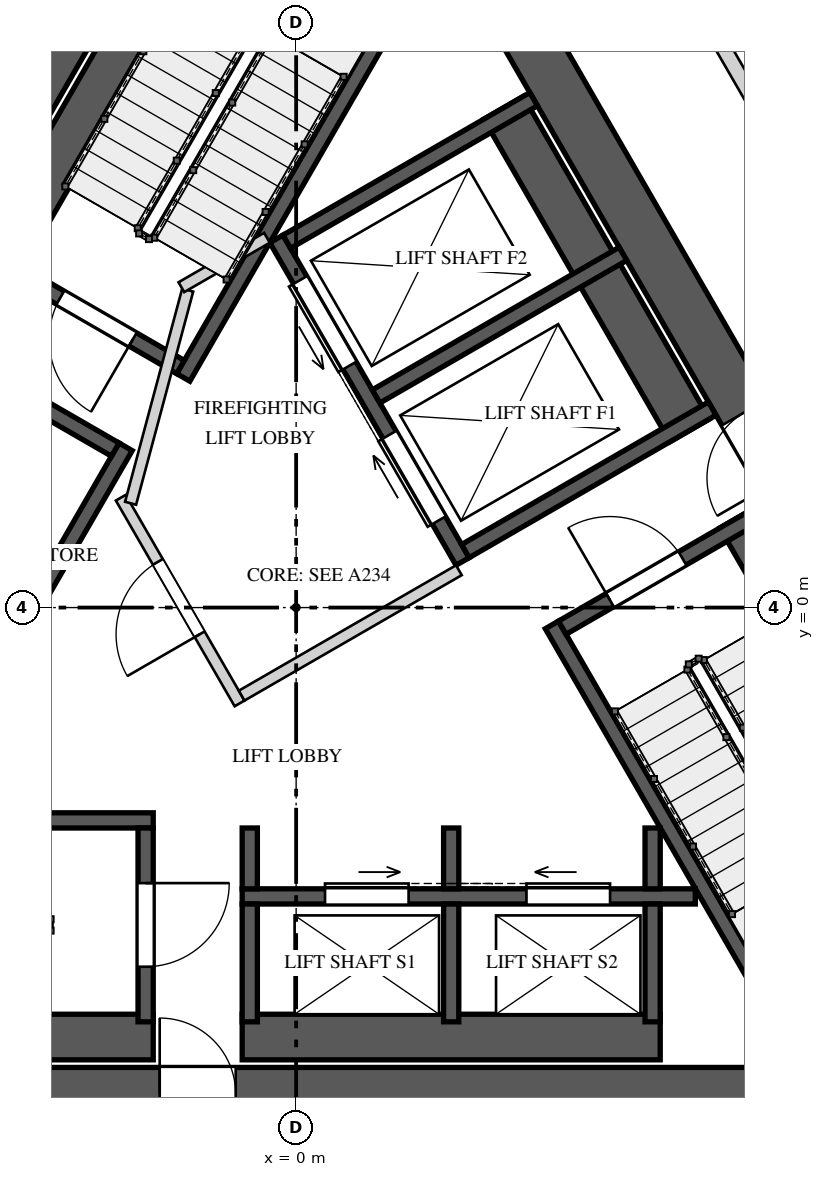
"""IFC4 building model, lengths in metres.
Left out: names, types, materials, properties, quantities, classifications, styles, units other than length and angle.
Written with IfcOpenShell. Run it as: python <this file> out.ifc"""

import sys

from ifc_helpers import new_model, si_unit, direction, frame, frame_2d, origin, place, context, subcontext, project, spatial, rectangle, extrude, element, fill, save


model = new_model("IFC4")
c1 = context("Model", 3, precision=1e-05, world=origin(), true_north=direction((0.0, 1.0)))
c2 = subcontext(c1, "Body", "Model", "MODEL_VIEW")
j1 = project(units=[si_unit("LENGTHUNIT", "METRE"), si_unit("PLANEANGLEUNIT", "RADIAN")], contexts=[c1])
p1 = place(None, origin())
s1 = spatial("IfcSite", under=j1, at=p1, CompositionType="ELEMENT")
p2 = place(p1, origin())
s2 = spatial("IfcBuilding", under=s1, at=p2, CompositionType="ELEMENT")
p3 = place(p2, frame((0.0, 0.0, 245.2)))
s3 = spatial("IfcBuildingStorey", under=s2, at=p3, CompositionType="ELEMENT", Elevation=245.2)
p4 = place(p3, frame((-1.241, 10.65, 0.0), z_axis=(0.0, 0.0, 1.0), x_axis=(-0.500003331888, -0.866023480109, 0.0)))
e1 = element("IfcWall", 1, at=p4, inside=s3, PredefinedType="SHEAR", context=c2, shape_type="SweptSolid", body=[
    extrude(rectangle(XDim=17.205, YDim=0.7, at=frame_2d((8.603, 0.0))), origin(), (0.0, 0.0, 1.0), 4.0),
])
p5 = place(p4, frame((6.808, 0.0, 0.0)))
e2 = element("IfcOpeningElement", 2, at=p5, cuts=e1, PredefinedType="OPENING", context=c2, shape_type="SweptSolid", body=[
    extrude(rectangle(XDim=1.0, YDim=2.4, at=frame_2d((0.5, 1.2))), frame((0.0, 0.36, 0.0), z_axis=(0.0, -1.0, 0.0), x_axis=(1.0, 0.0, 0.0)), (0.0, 0.0, 1.0), 0.72),
])
p6 = place(p4, frame((14.922, 0.0, 0.0)))
e3 = element("IfcOpeningElement", 3, at=p6, cuts=e1, PredefinedType="OPENING", context=c2, shape_type="SweptSolid", body=[
    extrude(rectangle(XDim=0.8, YDim=2.1, at=frame_2d((0.4, 1.05))), frame((0.0, 0.36, 0.0), z_axis=(0.0, -1.0, 0.0), x_axis=(1.0, 0.0, 0.0)), (0.0, 0.0, 1.0), 0.72),
])
p7 = place(p3, frame((-8.603, -6.4, 0.0), z_axis=(0.0, 0.0, 1.0), x_axis=(1.0, 0.0, 0.0)))
e4 = element("IfcWall", 4, at=p7, inside=s3, PredefinedType="SHEAR", context=c2, shape_type="SweptSolid", body=[
    extrude(rectangle(XDim=17.205, YDim=0.7, at=frame_2d((8.603, 0.0))), origin(), (0.0, 0.0, 1.0), 4.0),
])
p8 = place(p7, frame((6.808, 0.0, 0.0)))
e5 = element("IfcOpeningElement", 5, at=p8, cuts=e4, PredefinedType="OPENING", context=c2, shape_type="SweptSolid", body=[
    extrude(rectangle(XDim=1.0, YDim=2.4, at=frame_2d((0.5, 1.2))), frame((0.0, 0.36, 0.0), z_axis=(0.0, -1.0, 0.0), x_axis=(1.0, 0.0, 0.0)), (0.0, 0.0, 1.0), 0.72),
])
p9 = place(p3, frame((9.844, -4.25, 0.0), z_axis=(0.0, 0.0, 1.0), x_axis=(-0.500003331888, 0.866023480109, 0.0)))
e6 = element("IfcWall", 6, at=p9, inside=s3, PredefinedType="SHEAR", context=c2, shape_type="SweptSolid", body=[
    extrude(rectangle(XDim=17.205, YDim=0.7, at=frame_2d((8.603, 0.0))), origin(), (0.0, 0.0, 1.0), 4.0),
])
p10 = place(p9, frame((6.877, 0.0, 0.0)))
e7 = element("IfcOpeningElement", 7, at=p10, cuts=e6, PredefinedType="OPENING", context=c2, shape_type="SweptSolid", body=[
    extrude(rectangle(XDim=1.0, YDim=2.4, at=frame_2d((0.5, 1.2))), frame((0.0, 0.36, 0.0), z_axis=(0.0, -1.0, 0.0), x_axis=(1.0, 0.0, 0.0)), (0.0, 0.0, 1.0), 0.72),
])
p11 = place(p3, frame((-0.853, 9.823, 0.0), z_axis=(0.0, 0.0, 1.0), x_axis=(-0.500009909098, -0.866019682689, 0.0)))
e8 = element("IfcWall", 8, at=p11, inside=s3, PredefinedType="SOLIDWALL", context=c2, shape_type="SweptSolid", body=[
    extrude(rectangle(XDim=6.2, YDim=0.6, at=frame_2d((3.1, 0.0))), origin(), (0.0, 0.0, 1.0), 3.65),
])
p12 = place(p3, frame((1.876, 8.85, 0.0), z_axis=(0.0, 0.0, 1.0), x_axis=(-0.499998042495, -0.866026533947, 0.0)))
e9 = element("IfcWall", 9, at=p12, inside=s3, PredefinedType="SOLIDWALL", context=c2, shape_type="SweptSolid", body=[
    extrude(rectangle(XDim=6.723, YDim=0.2, at=frame_2d((3.361, 0.0))), origin(), (0.0, 0.0, 1.0), 3.65),
])
p13 = place(p3, frame((-1.521, 3.165, 0.0), z_axis=(0.0, 0.0, 1.0), x_axis=(-0.866035871367, 0.499981869177, 0.0)))
e10 = element("IfcWall", 10, at=p13, inside=s3, PredefinedType="SOLIDWALL", context=c2, shape_type="SweptSolid", body=[
    extrude(rectangle(XDim=3.15, YDim=0.2, at=frame_2d((1.575, 0.0))), origin(), (0.0, 0.0, 1.0), 3.65),
])
p14 = place(p13, frame((0.725, 0.0, 0.0)))
e11 = element("IfcOpeningElement", 11, at=p14, cuts=e10, PredefinedType="OPENING", context=c2, shape_type="SweptSolid", body=[
    extrude(rectangle(XDim=1.1, YDim=2.4, at=frame_2d((0.55, 1.2))), frame((0.0, 0.11, 0.0), z_axis=(0.0, -1.0, 0.0), x_axis=(1.0, 0.0, 0.0)), (0.0, 0.0, 1.0), 0.22),
])
p15 = place(p3, frame((-8.08, -5.65, 0.0), z_axis=(0.0, 0.0, 1.0), x_axis=(1.0, 0.0, 0.0)))
e12 = element("IfcWall", 12, at=p15, inside=s3, PredefinedType="SOLIDWALL", context=c2, shape_type="SweptSolid", body=[
    extrude(rectangle(XDim=6.2, YDim=0.6, at=frame_2d((3.1, 0.0))), origin(), (0.0, 0.0, 1.0), 3.65),
])
p16 = place(p3, frame((-8.603, -2.8, 0.0), z_axis=(0.0, 0.0, 1.0), x_axis=(1.0, 0.0, 0.0)))
e13 = element("IfcWall", 13, at=p16, inside=s3, PredefinedType="SOLIDWALL", context=c2, shape_type="SweptSolid", body=[
    extrude(rectangle(XDim=6.723, YDim=0.2, at=frame_2d((3.361, 0.0))), origin(), (0.0, 0.0, 1.0), 3.65),
])
p17 = place(p3, frame((-1.98, -2.9, 0.0), z_axis=(0.0, 0.0, 1.0), x_axis=(0.0, -1.0, 0.0)))
e14 = element("IfcWall", 14, at=p17, inside=s3, PredefinedType="SOLIDWALL", context=c2, shape_type="SweptSolid", body=[
    extrude(rectangle(XDim=2.55, YDim=0.2, at=frame_2d((1.275, 0.0))), origin(), (0.0, 0.0, 1.0), 3.65),
])
p18 = place(p17, frame((0.725, 0.0, 0.0)))
e15 = element("IfcOpeningElement", 15, at=p18, cuts=e14, PredefinedType="OPENING", context=c2, shape_type="SweptSolid", body=[
    extrude(rectangle(XDim=1.1, YDim=2.4, at=frame_2d((0.55, 1.2))), frame((0.0, 0.11, 0.0), z_axis=(0.0, -1.0, 0.0), x_axis=(1.0, 0.0, 0.0)), (0.0, 0.0, 1.0), 0.22),
])
p19 = place(p3, frame((8.933, -4.172, 0.0), z_axis=(0.0, 0.0, 1.0), x_axis=(-0.500026960575, 0.86600983753, 0.0)))
e16 = element("IfcWall", 16, at=p19, inside=s3, PredefinedType="SOLIDWALL", context=c2, shape_type="SweptSolid", body=[
    extrude(rectangle(XDim=6.2, YDim=0.6, at=frame_2d((3.1, 0.0))), origin(), (0.0, 0.0, 1.0), 3.65),
])
p20 = place(p3, frame((6.726, -6.05, 0.0), z_axis=(0.0, 0.0, 1.0), x_axis=(-0.499970804718, 0.866042259032, 0.0)))
e17 = element("IfcWall", 17, at=p20, inside=s3, PredefinedType="SOLIDWALL", context=c2, shape_type="SweptSolid", body=[
    extrude(rectangle(XDim=6.723, YDim=0.2, at=frame_2d((3.361, 0.0))), origin(), (0.0, 0.0, 1.0), 3.65),
])
p21 = place(p3, frame((3.501, -0.265, 0.0), z_axis=(0.0, 0.0, 1.0), x_axis=(0.866035871367, 0.499981869177, 0.0)))
e18 = element("IfcWall", 18, at=p21, inside=s3, PredefinedType="SOLIDWALL", context=c2, shape_type="SweptSolid", body=[
    extrude(rectangle(XDim=3.15, YDim=0.2, at=frame_2d((1.575, 0.0))), origin(), (0.0, 0.0, 1.0), 3.65),
])
p22 = place(p21, frame((0.725, 0.0, 0.0)))
e19 = element("IfcOpeningElement", 19, at=p22, cuts=e18, PredefinedType="OPENING", context=c2, shape_type="SweptSolid", body=[
    extrude(rectangle(XDim=1.1, YDim=2.4, at=frame_2d((0.55, 1.2))), frame((0.0, 0.11, 0.0), z_axis=(0.0, -1.0, 0.0), x_axis=(1.0, 0.0, 0.0)), (0.0, 0.0, 1.0), 0.22),
])
p23 = place(p3, frame((-4.993, -2.648, 0.0), z_axis=(0.0, 0.0, 1.0), x_axis=(0.499996545922, 0.866027397988, 0.0)))
e20 = element("IfcWall", 20, at=p23, inside=s3, PredefinedType="SOLIDWALL", context=c2, shape_type="SweptSolid", body=[
    extrude(rectangle(XDim=5.5, YDim=0.2, at=frame_2d((2.75, 0.0))), origin(), (0.0, 0.0, 1.0), 3.65),
])
p24 = place(p23, frame((2.275, 0.0, 0.0)))
e21 = element("IfcOpeningElement", 21, at=p24, cuts=e20, PredefinedType="OPENING", context=c2, shape_type="SweptSolid", body=[
    extrude(rectangle(XDim=0.95, YDim=2.4, at=frame_2d((0.475, 1.2))), frame((0.0, 0.11, 0.0), z_axis=(0.0, -1.0, 0.0), x_axis=(1.0, 0.0, 0.0)), (0.0, 0.0, 1.0), 0.22),
])
p25 = place(p3, frame((-2.38, 2.078, 0.0), z_axis=(0.0, 0.0, 1.0), x_axis=(-0.866060182126, 0.499939757307, 0.0)))
e22 = element("IfcWall", 22, at=p25, inside=s3, PredefinedType="SOLIDWALL", context=c2, shape_type="SweptSolid", body=[
    extrude(rectangle(XDim=2.95, YDim=0.2, at=frame_2d((1.475, 0.0))), origin(), (0.0, 0.0, 1.0), 3.65),
])
p26 = place(p3, frame((-0.71, -3.8, 0.0), z_axis=(0.0, 0.0, 1.0), x_axis=(1.0, 0.0, 0.0)))
e23 = element("IfcWall", 23, at=p26, inside=s3, PredefinedType="SOLIDWALL", context=c2, shape_type="SweptSolid", body=[
    extrude(rectangle(XDim=5.961, YDim=0.2, at=frame_2d((2.981, 0.0))), origin(), (0.0, 0.0, 1.0), 3.65),
])
p27 = place(p26, frame((1.09, 0.0, 0.0)))
e24 = element("IfcOpeningElement", 24, at=p27, cuts=e23, PredefinedType="OPENING", context=c2, shape_type="SweptSolid", body=[
    extrude(rectangle(XDim=1.1, YDim=2.1, at=frame_2d((0.55, 1.05))), frame((0.0, 0.11, 0.0), z_axis=(0.0, -1.0, 0.0), x_axis=(1.0, 0.0, 0.0)), (0.0, 0.0, 1.0), 0.22),
])
p28 = place(p26, frame((3.74, 0.0, 0.0)))
e25 = element("IfcOpeningElement", 25, at=p28, cuts=e23, PredefinedType="OPENING", context=c2, shape_type="SweptSolid", body=[
    extrude(rectangle(XDim=1.1, YDim=2.1, at=frame_2d((0.55, 1.05))), frame((0.0, 0.11, 0.0), z_axis=(0.0, -1.0, 0.0), x_axis=(1.0, 0.0, 0.0)), (0.0, 0.0, 1.0), 0.22),
])
p29 = place(p3, frame((-0.71, -5.65, 0.0), z_axis=(0.0, 0.0, 1.0), x_axis=(1.0, 0.0, 0.0)))
e26 = element("IfcWall", 26, at=p29, inside=s3, PredefinedType="SOLIDWALL", context=c2, shape_type="SweptSolid", body=[
    extrude(rectangle(XDim=5.5, YDim=0.6, at=frame_2d((2.75, 0.0))), origin(), (0.0, 0.0, 1.0), 3.65),
])
p30 = place(p3, frame((-0.61, -3.9, 0.0), z_axis=(0.0, 0.0, 1.0), x_axis=(0.0, -1.0, 0.0)))
e27 = element("IfcWall", 27, at=p30, inside=s3, PredefinedType="SOLIDWALL", context=c2, shape_type="SweptSolid", body=[
    extrude(rectangle(XDim=1.55, YDim=0.2, at=frame_2d((0.775, 0.0))), origin(), (0.0, 0.0, 1.0), 3.65),
])
p31 = place(p3, frame((-0.61, -2.9, 0.0), z_axis=(0.0, 0.0, 1.0), x_axis=(0.0, -1.0, 0.0)))
e28 = element("IfcWall", 28, at=p31, inside=s3, PredefinedType="SOLIDWALL", context=c2, shape_type="SweptSolid", body=[
    extrude(rectangle(XDim=0.8, YDim=0.2, at=frame_2d((0.4, 0.0))), origin(), (0.0, 0.0, 1.0), 3.65),
])
p32 = place(p3, frame((2.04, -3.9, 0.0), z_axis=(0.0, 0.0, 1.0), x_axis=(0.0, -1.0, 0.0)))
e29 = element("IfcWall", 29, at=p32, inside=s3, PredefinedType="SOLIDWALL", context=c2, shape_type="SweptSolid", body=[
    extrude(rectangle(XDim=1.55, YDim=0.2, at=frame_2d((0.775, 0.0))), origin(), (0.0, 0.0, 1.0), 3.65),
])
p33 = place(p3, frame((2.04, -2.9, 0.0), z_axis=(0.0, 0.0, 1.0), x_axis=(0.0, -1.0, 0.0)))
e30 = element("IfcWall", 30, at=p33, inside=s3, PredefinedType="SOLIDWALL", context=c2, shape_type="SweptSolid", body=[
    extrude(rectangle(XDim=0.8, YDim=0.2, at=frame_2d((0.4, 0.0))), origin(), (0.0, 0.0, 1.0), 3.65),
])
p34 = place(p3, frame((4.69, -3.9, 0.0), z_axis=(0.0, 0.0, 1.0), x_axis=(0.0, -1.0, 0.0)))
e31 = element("IfcWall", 31, at=p34, inside=s3, PredefinedType="SOLIDWALL", context=c2, shape_type="SweptSolid", body=[
    extrude(rectangle(XDim=1.55, YDim=0.2, at=frame_2d((0.775, 0.0))), origin(), (0.0, 0.0, 1.0), 3.65),
])
p35 = place(p3, frame((4.69, -2.9, 0.0), z_axis=(0.0, 0.0, 1.0), x_axis=(0.0, -1.0, 0.0)))
e32 = element("IfcWall", 32, at=p35, inside=s3, PredefinedType="SOLIDWALL", context=c2, shape_type="SweptSolid", body=[
    extrude(rectangle(XDim=0.8, YDim=0.2, at=frame_2d((0.4, 0.0))), origin(), (0.0, 0.0, 1.0), 3.65),
])
p36 = place(p3, frame((2.19, 0.606, 0.0), z_axis=(0.0, 0.0, 1.0), x_axis=(-0.500002801628, 0.866023786258, 0.0)))
e33 = element("IfcWall", 33, at=p36, inside=s3, PredefinedType="SOLIDWALL", context=c2, shape_type="SweptSolid", body=[
    extrude(rectangle(XDim=4.9, YDim=0.2, at=frame_2d((2.45, 0.0))), origin(), (0.0, 0.0, 1.0), 3.65),
])
p37 = place(p36, frame((0.625, 0.0, 0.0)))
e34 = element("IfcOpeningElement", 34, at=p37, cuts=e33, PredefinedType="OPENING", context=c2, shape_type="SweptSolid", body=[
    extrude(rectangle(XDim=1.3, YDim=2.1, at=frame_2d((0.65, 1.05))), frame((0.0, 0.11, 0.0), z_axis=(0.0, -1.0, 0.0), x_axis=(1.0, 0.0, 0.0)), (0.0, 0.0, 1.0), 0.22),
])
p38 = place(p36, frame((2.975, 0.0, 0.0)))
e35 = element("IfcOpeningElement", 35, at=p38, cuts=e33, PredefinedType="OPENING", context=c2, shape_type="SweptSolid", body=[
    extrude(rectangle(XDim=1.3, YDim=2.1, at=frame_2d((0.65, 1.05))), frame((0.0, 0.11, 0.0), z_axis=(0.0, -1.0, 0.0), x_axis=(1.0, 0.0, 0.0)), (0.0, 0.0, 1.0), 0.22),
])
p39 = place(p3, frame((5.178, 2.331, 0.0), z_axis=(0.0, 0.0, 1.0), x_axis=(-0.49998122708, 0.866036242063, 0.0)))
e36 = element("IfcWall", 36, at=p39, inside=s3, PredefinedType="SOLIDWALL", context=c2, shape_type="SweptSolid", body=[
    extrude(rectangle(XDim=4.9, YDim=0.6, at=frame_2d((2.45, 0.0))), origin(), (0.0, 0.0, 1.0), 3.65),
])
p40 = place(p3, frame((2.227, 0.743, 0.0), z_axis=(0.0, 0.0, 1.0), x_axis=(0.866022959057, 0.500004234368, 0.0)))
e37 = element("IfcWall", 37, at=p40, inside=s3, PredefinedType="SOLIDWALL", context=c2, shape_type="SweptSolid", body=[
    extrude(rectangle(XDim=3.75, YDim=0.2, at=frame_2d((1.875, 0.0))), origin(), (0.0, 0.0, 1.0), 3.65),
])
p41 = place(p3, frame((1.052, 2.778, 0.0), z_axis=(0.0, 0.0, 1.0), x_axis=(0.866039234136, 0.499976044363, 0.0)))
e38 = element("IfcWall", 38, at=p41, inside=s3, PredefinedType="SOLIDWALL", context=c2, shape_type="SweptSolid", body=[
    extrude(rectangle(XDim=3.75, YDim=0.2, at=frame_2d((1.875, 0.0))), origin(), (0.0, 0.0, 1.0), 3.65),
])
p42 = place(p3, frame((-0.123, 4.813, 0.0), z_axis=(0.0, 0.0, 1.0), x_axis=(0.866022959057, 0.500004234368, 0.0)))
e39 = element("IfcWall", 39, at=p42, inside=s3, PredefinedType="SOLIDWALL", context=c2, shape_type="SweptSolid", body=[
    extrude(rectangle(XDim=3.75, YDim=0.2, at=frame_2d((1.875, 0.0))), origin(), (0.0, 0.0, 1.0), 3.65),
])
p43 = place(p3, frame((-0.744, -1.261, 0.0), z_axis=(0.0, 0.0, 1.0), x_axis=(-0.500004234368, 0.866022959057, 0.0)))
e40 = element("IfcWall", 40, at=p43, inside=s3, PredefinedType="PARTITIONING", context=c2, shape_type="SweptSolid", body=[
    extrude(rectangle(XDim=3.125, YDim=0.15, at=frame_2d((1.562, 0.0))), origin(), (0.0, 0.0, 1.0), 3.65),
])
p44 = place(p43, frame((1.05, 0.0, 0.0)))
e41 = element("IfcOpeningElement", 41, at=p44, cuts=e40, PredefinedType="OPENING", context=c2, shape_type="SweptSolid", body=[
    extrude(rectangle(XDim=1.1, YDim=2.4, at=frame_2d((0.55, 1.2))), frame((0.0, 0.085, 0.0), z_axis=(0.0, -1.0, 0.0), x_axis=(1.0, 0.0, 0.0)), (0.0, 0.0, 1.0), 0.17),
])
p45 = place(p3, frame((-0.717, -1.159, 0.0), z_axis=(0.0, 0.0, 1.0), x_axis=(0.866008176907, 0.50002983664, 0.0)))
e42 = element("IfcWall", 42, at=p45, inside=s3, PredefinedType="PARTITIONING", context=c2, shape_type="SweptSolid", body=[
    extrude(rectangle(XDim=3.3, YDim=0.15, at=frame_2d((1.65, 0.0))), origin(), (0.0, 0.0, 1.0), 3.65),
])
p46 = place(p3, frame((-2.178, 1.372, 0.0), z_axis=(0.0, 0.0, 1.0), x_axis=(0.258808958833, 0.96592852884, 0.0)))
e43 = element("IfcWall", 43, at=p46, inside=s3, PredefinedType="PARTITIONING", context=c2, shape_type="SweptSolid", body=[
    extrude(rectangle(XDim=2.903, YDim=0.15, at=frame_2d((1.451, 0.0))), origin(), (0.0, 0.0, 1.0), 3.65),
])
p47 = place(p3, frame((-1.51, 4.215, 0.0), z_axis=(0.0, 0.0, 1.0), x_axis=(0.866085525409, 0.49989585183, 0.0)))
e44 = element("IfcWall", 44, at=p47, inside=s3, PredefinedType="PARTITIONING", context=c2, shape_type="SweptSolid", body=[
    extrude(rectangle(XDim=1.3, YDim=0.15, at=frame_2d((0.65, 0.0))), origin(), (0.0, 0.0, 1.0), 3.65),
])
p48 = place(p3, frame((4.934, 11.253, 0.0), z_axis=(0.0, 0.0, 1.0), x_axis=(0.500001111708, -0.866024761939, 0.0)))
e45 = element("IfcWall", 45, at=p48, inside=s3, PredefinedType="PARTITIONING", context=c2, shape_type="SweptSolid", body=[
    extrude(rectangle(XDim=4.576, YDim=0.15, at=frame_2d((2.288, 0.0))), origin(), (0.0, 0.0, 1.0), 3.65),
])
p49 = place(p48, frame((0.445, 0.0, 0.0)))
e46 = element("IfcOpeningElement", 46, at=p49, cuts=e45, PredefinedType="OPENING", context=c2, shape_type="SweptSolid", body=[
    extrude(rectangle(XDim=0.95, YDim=2.4, at=frame_2d((0.475, 1.2))), frame((0.0, 0.085, 0.0), z_axis=(0.0, -1.0, 0.0), x_axis=(1.0, 0.0, 0.0)), (0.0, 0.0, 1.0), 0.17),
])
p50 = place(p3, frame((4.299, 9.655, 0.0), z_axis=(0.0, 0.0, 1.0), x_axis=(0.499997905474, -0.866026613056, 0.0)))
e47 = element("IfcWall", 47, at=p50, inside=s3, PredefinedType="SOLIDWALL", context=c2, shape_type="SweptSolid", body=[
    extrude(rectangle(XDim=3.811, YDim=0.2, at=frame_2d((1.905, 0.0))), origin(), (0.0, 0.0, 1.0), 3.65),
])
p51 = place(p14, origin())
e48 = element("IfcDoor", 48, at=p51, inside=s3, OperationType="SINGLE_SWING_RIGHT", PredefinedType="DOOR", context=c2, shape_type="SweptSolid", body=[
    extrude(rectangle(XDim=1.1, YDim=2.4, at=frame_2d((0.55, 1.2))), frame((0.0, 0.025, 0.0), z_axis=(0.0, -1.0, 0.0), x_axis=(1.0, 0.0, 0.0)), (0.0, 0.0, 1.0), 0.05),
])
fill(e11, e48)
p52 = place(p18, origin())
e49 = element("IfcDoor", 49, at=p52, inside=s3, OperationType="SINGLE_SWING_LEFT", PredefinedType="DOOR", context=c2, shape_type="SweptSolid", body=[
    extrude(rectangle(XDim=1.1, YDim=2.4, at=frame_2d((0.55, 1.2))), frame((0.0, 0.025, 0.0), z_axis=(0.0, -1.0, 0.0), x_axis=(1.0, 0.0, 0.0)), (0.0, 0.0, 1.0), 0.05),
])
fill(e15, e49)
p53 = place(p22, origin())
e50 = element("IfcDoor", 50, at=p53, inside=s3, OperationType="SINGLE_SWING_RIGHT", PredefinedType="DOOR", context=c2, shape_type="SweptSolid", body=[
    extrude(rectangle(XDim=1.1, YDim=2.4, at=frame_2d((0.55, 1.2))), frame((0.0, 0.025, 0.0), z_axis=(0.0, -1.0, 0.0), x_axis=(1.0, 0.0, 0.0)), (0.0, 0.0, 1.0), 0.05),
])
fill(e19, e50)
p54 = place(p27, origin())
e51 = element("IfcDoor", 51, at=p54, inside=s3, OperationType="SLIDING_TO_RIGHT", PredefinedType="DOOR", context=c2, shape_type="SweptSolid", body=[
    extrude(rectangle(XDim=1.1, YDim=2.1, at=frame_2d((0.55, 1.05))), frame((0.0, 0.025, 0.0), z_axis=(0.0, -1.0, 0.0), x_axis=(1.0, 0.0, 0.0)), (0.0, 0.0, 1.0), 0.05),
])
fill(e24, e51)
p55 = place(p28, origin())
e52 = element("IfcDoor", 52, at=p55, inside=s3, OperationType="SLIDING_TO_LEFT", PredefinedType="DOOR", context=c2, shape_type="SweptSolid", body=[
    extrude(rectangle(XDim=1.1, YDim=2.1, at=frame_2d((0.55, 1.05))), frame((0.0, 0.025, 0.0), z_axis=(0.0, -1.0, 0.0), x_axis=(1.0, 0.0, 0.0)), (0.0, 0.0, 1.0), 0.05),
])
fill(e25, e52)
p56 = place(p37, origin())
e53 = element("IfcDoor", 53, at=p56, inside=s3, OperationType="SLIDING_TO_RIGHT", PredefinedType="DOOR", context=c2, shape_type="SweptSolid", body=[
    extrude(rectangle(XDim=1.3, YDim=2.1, at=frame_2d((0.65, 1.05))), frame((0.0, 0.025, 0.0), z_axis=(0.0, -1.0, 0.0), x_axis=(1.0, 0.0, 0.0)), (0.0, 0.0, 1.0), 0.05),
])
fill(e34, e53)
p57 = place(p38, origin())
e54 = element("IfcDoor", 54, at=p57, inside=s3, OperationType="SLIDING_TO_LEFT", PredefinedType="DOOR", context=c2, shape_type="SweptSolid", body=[
    extrude(rectangle(XDim=1.3, YDim=2.1, at=frame_2d((0.65, 1.05))), frame((0.0, 0.025, 0.0), z_axis=(0.0, -1.0, 0.0), x_axis=(1.0, 0.0, 0.0)), (0.0, 0.0, 1.0), 0.05),
])
fill(e35, e54)
p58 = place(p44, origin())
e55 = element("IfcDoor", 55, at=p58, inside=s3, OperationType="SINGLE_SWING_RIGHT", PredefinedType="DOOR", context=c2, shape_type="SweptSolid", body=[
    extrude(rectangle(XDim=1.1, YDim=2.4, at=frame_2d((0.55, 1.2))), frame((0.0, 0.025, 0.0), z_axis=(0.0, -1.0, 0.0), x_axis=(1.0, 0.0, 0.0)), (0.0, 0.0, 1.0), 0.05),
])
fill(e41, e55)
p59 = place(p8, origin())
e56 = element("IfcDoor", 56, at=p59, inside=s3, OperationType="SINGLE_SWING_RIGHT", PredefinedType="DOOR", context=c2, shape_type="SweptSolid", body=[
    extrude(rectangle(XDim=1.0, YDim=2.4, at=frame_2d((0.5, 1.2))), frame((0.0, 0.025, 0.0), z_axis=(0.0, -1.0, 0.0), x_axis=(1.0, 0.0, 0.0)), (0.0, 0.0, 1.0), 0.05),
])
fill(e5, e56)
p60 = place(p10, origin())
e57 = element("IfcDoor", 57, at=p60, inside=s3, OperationType="SINGLE_SWING_LEFT", PredefinedType="DOOR", context=c2, shape_type="SweptSolid", body=[
    extrude(rectangle(XDim=1.0, YDim=2.4, at=frame_2d((0.5, 1.2))), frame((0.0, 0.025, 0.0), z_axis=(0.0, -1.0, 0.0), x_axis=(1.0, 0.0, 0.0)), (0.0, 0.0, 1.0), 0.05),
])
fill(e7, e57)
save(model, sys.argv[1])
